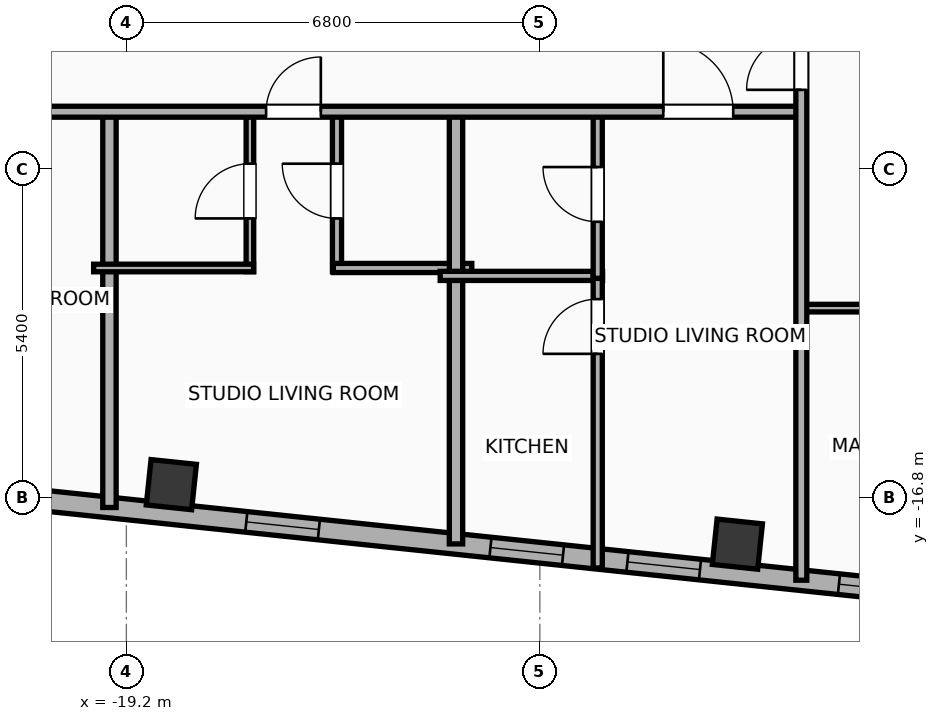
"""IFC4 building model, lengths in metres.
Left out: names, types, materials, properties, quantities, classifications, styles, units other than length and angle.
Written with IfcOpenShell. Run it as: python <this file> out.ifc"""

import sys

from ifc_helpers import new_model, si_unit, direction, frame, frame_2d, origin, origin_2d, place, context, subcontext, project, spatial, rectangle, hollow_rectangle, extrude, element, fill, save


model = new_model("IFC4")
c1 = context("Model", 3, precision=1e-05, world=origin(), true_north=direction((0.0, 1.0)))
c2 = subcontext(c1, "Body", "Model", "MODEL_VIEW")
j1 = project(units=[si_unit("LENGTHUNIT", "METRE"), si_unit("PLANEANGLEUNIT", "RADIAN")], contexts=[c1])
p1 = place(None, origin())
s1 = spatial("IfcSite", under=j1, at=p1, CompositionType="ELEMENT")
p2 = place(p1, origin())
s2 = spatial("IfcBuilding", under=s1, at=p2, CompositionType="ELEMENT")
p3 = place(p2, frame((0.0, 0.0, 306.8)))
s3 = spatial("IfcBuildingStorey", under=s2, at=p3, CompositionType="ELEMENT", Elevation=306.8)
for number, where, z_axis, x_axis in (
    (1, (-18.46, -16.583, 0.0), (0.0, 0.0, 1.0), (0.995, -0.105, 0.0)),
    (2, (-9.152, -17.561, 0.0), (0.0, 0.0, 1.0), (0.995, -0.105, 0.0)),
):
    element("IfcColumn", number, at=place(p3, frame(where, z_axis=z_axis, x_axis=x_axis)), inside=s3, PredefinedType="COLUMN", context=c2, shape_type="SweptSolid", body=[
        extrude(hollow_rectangle(XDim=0.75, YDim=0.75, WallThickness=0.025, at=origin_2d()), origin(), (0.0, 0.0, 1.0), 3.865),
    ])
p4 = place(p3, frame((18.708, -20.972, 0.0), z_axis=(0.0, 0.0, 1.0), x_axis=(-0.994521888554, 0.104528528102, 0.0)))
e3 = element("IfcWall", 3, at=p4, inside=s3, PredefinedType="ELEMENTEDWALL", context=c2, shape_type="SweptSolid", body=[
    extrude(rectangle(XDim=46.766, YDim=0.34, at=frame_2d((23.383, 0.0))), origin(), (0.0, 0.0, 1.0), 2.39),
])
p5 = place(p4, frame((23.733, 0.0, 0.65)))
e4 = element("IfcOpeningElement", 4, at=p5, cuts=e3, PredefinedType="OPENING", context=c2, shape_type="SweptSolid", body=[
    extrude(rectangle(XDim=2.6, YDim=1.45, at=frame_2d((1.3, 0.725))), frame((0.0, 0.18, 0.0), z_axis=(0.0, -1.0, 0.0), x_axis=(1.0, 0.0, 0.0)), (0.0, 0.0, 1.0), 0.36),
])
p6 = place(p4, frame((44.402, 0.0, 0.55)))
e5 = element("IfcOpeningElement", 5, at=p6, cuts=e3, PredefinedType="OPENING", context=c2, shape_type="SweptSolid", body=[
    extrude(rectangle(XDim=1.2, YDim=1.15, at=frame_2d((0.6, 0.575))), frame((0.0, 0.18, 0.0), z_axis=(0.0, -1.0, 0.0), x_axis=(1.0, 0.0, 0.0)), (0.0, 0.0, 1.0), 0.36),
])
p7 = place(p4, frame((39.54, 0.0, 0.55)))
e6 = element("IfcOpeningElement", 6, at=p7, cuts=e3, PredefinedType="OPENING", context=c2, shape_type="SweptSolid", body=[
    extrude(rectangle(XDim=1.2, YDim=1.15, at=frame_2d((0.6, 0.575))), frame((0.0, 0.18, 0.0), z_axis=(0.0, -1.0, 0.0), x_axis=(1.0, 0.0, 0.0)), (0.0, 0.0, 1.0), 0.36),
])
p8 = place(p4, frame((42.406, 0.0, 0.55)))
e7 = element("IfcOpeningElement", 7, at=p8, cuts=e3, PredefinedType="OPENING", context=c2, shape_type="SweptSolid", body=[
    extrude(rectangle(XDim=1.2, YDim=1.15, at=frame_2d((0.6, 0.575))), frame((0.0, 0.18, 0.0), z_axis=(0.0, -1.0, 0.0), x_axis=(1.0, 0.0, 0.0)), (0.0, 0.0, 1.0), 0.36),
])
p9 = place(p4, frame((34.933, 0.0, 0.55)))
e8 = element("IfcOpeningElement", 8, at=p9, cuts=e3, PredefinedType="OPENING", context=c2, shape_type="SweptSolid", body=[
    extrude(rectangle(XDim=1.2, YDim=1.15, at=frame_2d((0.6, 0.575))), frame((0.0, 0.18, 0.0), z_axis=(0.0, -1.0, 0.0), x_axis=(1.0, 0.0, 0.0)), (0.0, 0.0, 1.0), 0.36),
])
p10 = place(p4, frame((28.631, 0.0, 0.55)))
e9 = element("IfcOpeningElement", 9, at=p10, cuts=e3, PredefinedType="OPENING", context=c2, shape_type="SweptSolid", body=[
    extrude(rectangle(XDim=1.2, YDim=1.15, at=frame_2d((0.6, 0.575))), frame((0.0, 0.18, 0.0), z_axis=(0.0, -1.0, 0.0), x_axis=(1.0, 0.0, 0.0)), (0.0, 0.0, 1.0), 0.36),
])
p11 = place(p4, frame((30.896, 0.0, 0.55)))
e10 = element("IfcOpeningElement", 10, at=p11, cuts=e3, PredefinedType="OPENING", context=c2, shape_type="SweptSolid", body=[
    extrude(rectangle(XDim=1.2, YDim=1.15, at=frame_2d((0.6, 0.575))), frame((0.0, 0.18, 0.0), z_axis=(0.0, -1.0, 0.0), x_axis=(1.0, 0.0, 0.0)), (0.0, 0.0, 1.0), 0.36),
])
p12 = place(p4, frame((7.501, 0.0, 0.55)))
e11 = element("IfcOpeningElement", 11, at=p12, cuts=e3, PredefinedType="OPENING", context=c2, shape_type="SweptSolid", body=[
    extrude(rectangle(XDim=1.2, YDim=1.15, at=frame_2d((0.6, 0.575))), frame((0.0, 0.18, 0.0), z_axis=(0.0, -1.0, 0.0), x_axis=(1.0, 0.0, 0.0)), (0.0, 0.0, 1.0), 0.36),
])
p13 = place(p4, frame((4.159, 0.0, 0.55)))
e12 = element("IfcOpeningElement", 12, at=p13, cuts=e3, PredefinedType="OPENING", context=c2, shape_type="SweptSolid", body=[
    extrude(rectangle(XDim=1.2, YDim=1.15, at=frame_2d((0.6, 0.575))), frame((0.0, 0.18, 0.0), z_axis=(0.0, -1.0, 0.0), x_axis=(1.0, 0.0, 0.0)), (0.0, 0.0, 1.0), 0.36),
])
p14 = place(p4, frame((1.369, 0.0, 0.55)))
e13 = element("IfcOpeningElement", 13, at=p14, cuts=e3, PredefinedType="OPENING", context=c2, shape_type="SweptSolid", body=[
    extrude(rectangle(XDim=1.2, YDim=1.15, at=frame_2d((0.6, 0.575))), frame((0.0, 0.18, 0.0), z_axis=(0.0, -1.0, 0.0), x_axis=(1.0, 0.0, 0.0)), (0.0, 0.0, 1.0), 0.36),
])
p15 = place(p4, frame((20.254, 0.0, 0.55)))
e14 = element("IfcOpeningElement", 14, at=p15, cuts=e3, PredefinedType="OPENING", context=c2, shape_type="SweptSolid", body=[
    extrude(rectangle(XDim=1.2, YDim=1.15, at=frame_2d((0.6, 0.575))), frame((0.0, 0.18, 0.0), z_axis=(0.0, -1.0, 0.0), x_axis=(1.0, 0.0, 0.0)), (0.0, 0.0, 1.0), 0.36),
])
p16 = place(p4, frame((16.172, 0.0, 0.55)))
e15 = element("IfcOpeningElement", 15, at=p16, cuts=e3, PredefinedType="OPENING", context=c2, shape_type="SweptSolid", body=[
    extrude(rectangle(XDim=1.2, YDim=1.15, at=frame_2d((0.6, 0.575))), frame((0.0, 0.18, 0.0), z_axis=(0.0, -1.0, 0.0), x_axis=(1.0, 0.0, 0.0)), (0.0, 0.0, 1.0), 0.36),
])
p17 = place(p4, frame((12.11, 0.0, 0.55)))
e16 = element("IfcOpeningElement", 16, at=p17, cuts=e3, PredefinedType="OPENING", context=c2, shape_type="SweptSolid", body=[
    extrude(rectangle(XDim=1.2, YDim=1.15, at=frame_2d((0.6, 0.575))), frame((0.0, 0.18, 0.0), z_axis=(0.0, -1.0, 0.0), x_axis=(1.0, 0.0, 0.0)), (0.0, 0.0, 1.0), 0.36),
])
p18 = place(p3, frame((-19.478, -16.959, 0.0), z_axis=(0.0, 0.0, 1.0), x_axis=(0.0, 1.0, 0.0)))
e17 = element("IfcWall", 17, at=p18, inside=s3, PredefinedType="PARTITIONING", context=c2, shape_type="SweptSolid", body=[
    extrude(rectangle(XDim=6.589, YDim=0.22, at=frame_2d((3.294, 0.0))), origin(), (0.0, 0.0, 1.0), 3.5),
])
p19 = place(p3, frame((-17.168, -13.08, 0.0), z_axis=(0.0, 0.0, 1.0), x_axis=(0.0, 1.0, 0.0)))
e18 = element("IfcWall", 18, at=p19, inside=s3, PredefinedType="PARTITIONING", context=c2, shape_type="SweptSolid", body=[
    extrude(rectangle(XDim=2.65, YDim=0.125, at=frame_2d((1.325, 0.0))), origin(), (0.0, 0.0, 1.0), 3.5),
])
p20 = place(p19, frame((0.875, 0.0, 0.0)))
e19 = element("IfcOpeningElement", 19, at=p20, cuts=e18, PredefinedType="OPENING", context=c2, shape_type="SweptSolid", body=[
    extrude(rectangle(XDim=0.9, YDim=2.05, at=frame_2d((0.45, 1.025))), frame((0.0, 0.073, 0.0), z_axis=(0.0, -1.0, 0.0), x_axis=(1.0, 0.0, 0.0)), (0.0, 0.0, 1.0), 0.145),
])
p21 = place(p3, frame((-15.736, -13.08, 0.0), z_axis=(0.0, 0.0, 1.0), x_axis=(0.0, 1.0, 0.0)))
e20 = element("IfcWall", 20, at=p21, inside=s3, PredefinedType="PLUMBINGWALL", context=c2, shape_type="SweptSolid", body=[
    extrude(rectangle(XDim=2.65, YDim=0.15, at=frame_2d((1.325, 0.0))), origin(), (0.0, 0.0, 1.0), 3.5),
])
p22 = place(p21, frame((0.875, 0.0, 0.0)))
e21 = element("IfcOpeningElement", 21, at=p22, cuts=e20, PredefinedType="OPENING", context=c2, shape_type="SweptSolid", body=[
    extrude(rectangle(XDim=0.9, YDim=2.05, at=frame_2d((0.45, 1.025))), frame((0.0, 0.085, 0.0), z_axis=(0.0, -1.0, 0.0), x_axis=(1.0, 0.0, 0.0)), (0.0, 0.0, 1.0), 0.17),
])
p23 = place(p3, frame((-19.738, -13.02, 0.0), z_axis=(0.0, 0.0, 1.0), x_axis=(1.0, 0.0, 0.0)))
e22 = element("IfcWall", 22, at=p23, inside=s3, PredefinedType="PARTITIONING", context=c2, shape_type="SweptSolid", body=[
    extrude(rectangle(XDim=2.63, YDim=0.125, at=frame_2d((1.315, 0.0))), origin(), (0.0, 0.0, 1.0), 3.5),
])
p24 = place(p3, frame((-15.796, -13.02, 0.0), z_axis=(0.0, 0.0, 1.0), x_axis=(1.0, 0.0, 0.0)))
e23 = element("IfcWall", 23, at=p24, inside=s3, PredefinedType="PLUMBINGWALL", context=c2, shape_type="SweptSolid", body=[
    extrude(rectangle(XDim=2.277, YDim=0.15, at=frame_2d((1.138, 0.0))), origin(), (0.0, 0.0, 1.0), 3.5),
])
p25 = place(p3, frame((-13.779, -17.558, 0.0), z_axis=(0.0, 0.0, 1.0), x_axis=(0.0, 1.0, 0.0)))
e24 = element("IfcWall", 24, at=p25, inside=s3, PredefinedType="PARTITIONING", context=c2, shape_type="SweptSolid", body=[
    extrude(rectangle(XDim=7.188, YDim=0.22, at=frame_2d((3.594, 0.0))), origin(), (0.0, 0.0, 1.0), 3.5),
])
p26 = place(p3, frame((-14.039, -13.15, 0.0), z_axis=(0.0, 0.0, 1.0), x_axis=(1.0, 0.0, 0.0)))
e25 = element("IfcWall", 25, at=p26, inside=s3, PredefinedType="PLUMBINGWALL", context=c2, shape_type="SweptSolid", body=[
    extrude(rectangle(XDim=2.671, YDim=0.15, at=frame_2d((1.335, 0.0))), origin(), (0.0, 0.0, 1.0), 3.5),
])
p27 = place(p3, frame((-11.448, -17.954, 0.0), z_axis=(0.0, 0.0, 1.0), x_axis=(0.0, 1.0, 0.0)))
e26 = element("IfcWall", 26, at=p27, inside=s3, PredefinedType="PLUMBINGWALL", context=c2, shape_type="SweptSolid", body=[
    extrude(rectangle(XDim=4.844, YDim=0.15, at=frame_2d((2.422, 0.0))), origin(), (0.0, 0.0, 1.0), 3.5),
])
p28 = place(p27, frame((3.522, 0.0, 0.0)))
e27 = element("IfcOpeningElement", 27, at=p28, cuts=e26, PredefinedType="OPENING", context=c2, shape_type="SweptSolid", body=[
    extrude(rectangle(XDim=0.9, YDim=2.05, at=frame_2d((0.45, 1.025))), frame((0.0, 0.085, 0.0), z_axis=(0.0, -1.0, 0.0), x_axis=(1.0, 0.0, 0.0)), (0.0, 0.0, 1.0), 0.17),
])
p29 = place(p3, frame((-11.448, -13.19, 0.0), z_axis=(0.0, 0.0, 1.0), x_axis=(0.0, 1.0, 0.0)))
e28 = element("IfcWall", 28, at=p29, inside=s3, PredefinedType="PLUMBINGWALL", context=c2, shape_type="SweptSolid", body=[
    extrude(rectangle(XDim=2.76, YDim=0.15, at=frame_2d((1.38, 0.0))), origin(), (0.0, 0.0, 1.0), 2.39),
])
p30 = place(p29, frame((0.93, 0.0, 0.0)))
e29 = element("IfcOpeningElement", 29, at=p30, cuts=e28, PredefinedType="OPENING", context=c2, shape_type="SweptSolid", body=[
    extrude(rectangle(XDim=0.9, YDim=2.05, at=frame_2d((0.45, 1.025))), frame((0.0, 0.085, 0.0), z_axis=(0.0, -1.0, 0.0), x_axis=(1.0, 0.0, 0.0)), (0.0, 0.0, 1.0), 0.17),
])
p31 = place(p3, frame((-30.676, -10.45, 0.0), z_axis=(0.0, 0.0, 1.0), x_axis=(1.0, 0.0, 0.0)))
e30 = element("IfcWall", 30, at=p31, inside=s3, PredefinedType="PARTITIONING", context=c2, shape_type="SweptSolid", body=[
    extrude(rectangle(XDim=22.596, YDim=0.18, at=frame_2d((11.298, 0.0))), origin(), (0.0, 0.0, 1.0), 3.5),
])
p32 = place(p31, frame((2.336, 0.0, 0.0)))
e31 = element("IfcOpeningElement", 31, at=p32, cuts=e30, PredefinedType="OPENING", context=c2, shape_type="SweptSolid", body=[
    extrude(rectangle(XDim=0.9, YDim=2.05, at=frame_2d((0.45, 1.025))), frame((0.0, 0.1, 0.0), z_axis=(0.0, -1.0, 0.0), x_axis=(1.0, 0.0, 0.0)), (0.0, 0.0, 1.0), 0.2),
])
p33 = place(p31, frame((8.861, 0.0, 0.0)))
e32 = element("IfcOpeningElement", 32, at=p33, cuts=e30, PredefinedType="OPENING", context=c2, shape_type="SweptSolid", body=[
    extrude(rectangle(XDim=1.15, YDim=2.05, at=frame_2d((0.575, 1.025))), frame((0.0, 0.1, 0.0), z_axis=(0.0, -1.0, 0.0), x_axis=(1.0, 0.0, 0.0)), (0.0, 0.0, 1.0), 0.2),
])
p34 = place(p31, frame((13.774, 0.0, 0.0)))
e33 = element("IfcOpeningElement", 33, at=p34, cuts=e30, PredefinedType="OPENING", context=c2, shape_type="SweptSolid", body=[
    extrude(rectangle(XDim=0.9, YDim=2.05, at=frame_2d((0.45, 1.025))), frame((0.0, 0.1, 0.0), z_axis=(0.0, -1.0, 0.0), x_axis=(1.0, 0.0, 0.0)), (0.0, 0.0, 1.0), 0.2),
])
p35 = place(p31, frame((20.306, 0.0, 0.0)))
e34 = element("IfcOpeningElement", 34, at=p35, cuts=e30, PredefinedType="OPENING", context=c2, shape_type="SweptSolid", body=[
    extrude(rectangle(XDim=1.15, YDim=2.05, at=frame_2d((0.575, 1.025))), frame((0.0, 0.1, 0.0), z_axis=(0.0, -1.0, 0.0), x_axis=(1.0, 0.0, 0.0)), (0.0, 0.0, 1.0), 0.2),
])
p36 = place(p3, frame((-8.08, -13.68, 0.0), z_axis=(0.0, 0.0, 1.0), x_axis=(1.0, 0.0, 0.0)))
e35 = element("IfcWall", 35, at=p36, inside=s3, PredefinedType="PARTITIONING", context=c2, shape_type="SweptSolid", body=[
    extrude(rectangle(XDim=8.06, YDim=0.125, at=frame_2d((4.03, 0.0))), origin(), (0.0, 0.0, 1.0), 3.5),
])
p37 = place(p36, frame((1.323, 0.0, 0.0)))
e36 = element("IfcOpeningElement", 36, at=p37, cuts=e35, PredefinedType="OPENING", context=c2, shape_type="SweptSolid", body=[
    extrude(rectangle(XDim=0.9, YDim=2.05, at=frame_2d((0.45, 1.025))), frame((0.0, 0.073, 0.0), z_axis=(0.0, -1.0, 0.0), x_axis=(1.0, 0.0, 0.0)), (0.0, 0.0, 1.0), 0.145),
])
p38 = place(p36, frame((4.547, 0.0, 0.0)))
e37 = element("IfcOpeningElement", 37, at=p38, cuts=e35, PredefinedType="OPENING", context=c2, shape_type="SweptSolid", body=[
    extrude(rectangle(XDim=0.9, YDim=2.05, at=frame_2d((0.45, 1.025))), frame((0.0, 0.073, 0.0), z_axis=(0.0, -1.0, 0.0), x_axis=(1.0, 0.0, 0.0)), (0.0, 0.0, 1.0), 0.145),
])
p39 = place(p3, frame((-8.1, -18.155, 0.0), z_axis=(0.0, 0.0, 1.0), x_axis=(0.0, 1.0, 0.0)))
e38 = element("IfcWall", 38, at=p39, inside=s3, PredefinedType="PARTITIONING", context=c2, shape_type="SweptSolid", body=[
    extrude(rectangle(XDim=9.314, YDim=0.18, at=frame_2d((4.657, 0.0))), origin(), (0.0, 0.0, 1.0), 3.5),
])
p40 = place(p39, frame((8.064, 0.0, 0.0)))
e39 = element("IfcOpeningElement", 39, at=p40, cuts=e38, PredefinedType="OPENING", context=c2, shape_type="SweptSolid", body=[
    extrude(rectangle(XDim=0.9, YDim=2.05, at=frame_2d((0.45, 1.025))), frame((0.0, 0.1, 0.0), z_axis=(0.0, -1.0, 0.0), x_axis=(1.0, 0.0, 0.0)), (0.0, 0.0, 1.0), 0.2),
])
p41 = place(p5, origin())
e40 = element("IfcWindow", 40, at=p41, inside=s3, PartitioningType="SINGLE_PANEL", PredefinedType="WINDOW", context=c2, shape_type="SweptSolid", body=[
    extrude(rectangle(XDim=2.6, YDim=1.45, at=frame_2d((1.3, 0.725))), frame((0.0, 0.03, 0.0), z_axis=(0.0, -1.0, 0.0), x_axis=(1.0, 0.0, 0.0)), (0.0, 0.0, 1.0), 0.06),
])
fill(e4, e40)
p42 = place(p9, origin())
e41 = element("IfcWindow", 41, at=p42, inside=s3, PartitioningType="SINGLE_PANEL", PredefinedType="WINDOW", context=c2, shape_type="SweptSolid", body=[
    extrude(rectangle(XDim=1.2, YDim=1.15, at=frame_2d((0.6, 0.575))), frame((0.0, 0.03, 0.0), z_axis=(0.0, -1.0, 0.0), x_axis=(1.0, 0.0, 0.0)), (0.0, 0.0, 1.0), 0.06),
])
fill(e8, e41)
p43 = place(p10, origin())
e42 = element("IfcWindow", 42, at=p43, inside=s3, PartitioningType="SINGLE_PANEL", PredefinedType="WINDOW", context=c2, shape_type="SweptSolid", body=[
    extrude(rectangle(XDim=1.2, YDim=1.15, at=frame_2d((0.6, 0.575))), frame((0.0, 0.03, 0.0), z_axis=(0.0, -1.0, 0.0), x_axis=(1.0, 0.0, 0.0)), (0.0, 0.0, 1.0), 0.06),
])
fill(e9, e42)
p44 = place(p11, origin())
e43 = element("IfcWindow", 43, at=p44, inside=s3, PartitioningType="SINGLE_PANEL", PredefinedType="WINDOW", context=c2, shape_type="SweptSolid", body=[
    extrude(rectangle(XDim=1.2, YDim=1.15, at=frame_2d((0.6, 0.575))), frame((0.0, 0.03, 0.0), z_axis=(0.0, -1.0, 0.0), x_axis=(1.0, 0.0, 0.0)), (0.0, 0.0, 1.0), 0.06),
])
fill(e10, e43)
p45 = place(p20, origin())
e44 = element("IfcDoor", 44, at=p45, inside=s3, OperationType="SINGLE_SWING_LEFT", PredefinedType="DOOR", context=c2, shape_type="SweptSolid", body=[
    extrude(rectangle(XDim=0.9, YDim=2.05, at=frame_2d((0.45, 1.025))), frame((0.0, 0.025, 0.0), z_axis=(0.0, -1.0, 0.0), x_axis=(1.0, 0.0, 0.0)), (0.0, 0.0, 1.0), 0.05),
])
fill(e19, e44)
p46 = place(p22, origin())
e45 = element("IfcDoor", 45, at=p46, inside=s3, OperationType="SINGLE_SWING_RIGHT", PredefinedType="DOOR", context=c2, shape_type="SweptSolid", body=[
    extrude(rectangle(XDim=0.9, YDim=2.05, at=frame_2d((0.45, 1.025))), frame((0.0, 0.025, 0.0), z_axis=(0.0, -1.0, 0.0), x_axis=(1.0, 0.0, 0.0)), (0.0, 0.0, 1.0), 0.05),
])
fill(e21, e45)
p47 = place(p28, origin())
e46 = element("IfcDoor", 46, at=p47, inside=s3, OperationType="SINGLE_SWING_LEFT", PredefinedType="DOOR", context=c2, shape_type="SweptSolid", body=[
    extrude(rectangle(XDim=0.9, YDim=2.05, at=frame_2d((0.45, 1.025))), frame((0.0, 0.025, 0.0), z_axis=(0.0, -1.0, 0.0), x_axis=(1.0, 0.0, 0.0)), (0.0, 0.0, 1.0), 0.05),
])
fill(e27, e46)
p48 = place(p30, origin())
e47 = element("IfcDoor", 47, at=p48, inside=s3, OperationType="SINGLE_SWING_RIGHT", PredefinedType="DOOR", context=c2, shape_type="SweptSolid", body=[
    extrude(rectangle(XDim=0.9, YDim=2.05, at=frame_2d((0.45, 1.025))), frame((0.0, 0.025, 0.0), z_axis=(0.0, -1.0, 0.0), x_axis=(1.0, 0.0, 0.0)), (0.0, 0.0, 1.0), 0.05),
])
fill(e29, e47)
p49 = place(p34, origin())
e48 = element("IfcDoor", 48, at=p49, inside=s3, OperationType="SINGLE_SWING_RIGHT", PredefinedType="DOOR", context=c2, shape_type="SweptSolid", body=[
    extrude(rectangle(XDim=0.9, YDim=2.05, at=frame_2d((0.45, 1.025))), frame((0.0, 0.025, 0.0), z_axis=(0.0, -1.0, 0.0), x_axis=(1.0, 0.0, 0.0)), (0.0, 0.0, 1.0), 0.05),
])
fill(e33, e48)
p50 = place(p35, origin())
e49 = element("IfcDoor", 49, at=p50, inside=s3, OperationType="SINGLE_SWING_LEFT", PredefinedType="DOOR", context=c2, shape_type="SweptSolid", body=[
    extrude(rectangle(XDim=1.15, YDim=2.05, at=frame_2d((0.575, 1.025))), frame((0.0, 0.025, 0.0), z_axis=(0.0, -1.0, 0.0), x_axis=(1.0, 0.0, 0.0)), (0.0, 0.0, 1.0), 0.05),
])
fill(e34, e49)
p51 = place(p40, origin())
e50 = element("IfcDoor", 50, at=p51, inside=s3, OperationType="SINGLE_SWING_LEFT", PredefinedType="DOOR", context=c2, shape_type="SweptSolid", body=[
    extrude(rectangle(XDim=0.9, YDim=2.05, at=frame_2d((0.45, 1.025))), frame((0.0, 0.025, 0.0), z_axis=(0.0, -1.0, 0.0), x_axis=(1.0, 0.0, 0.0)), (0.0, 0.0, 1.0), 0.05),
])
fill(e39, e50)
save(model, sys.argv[1])
